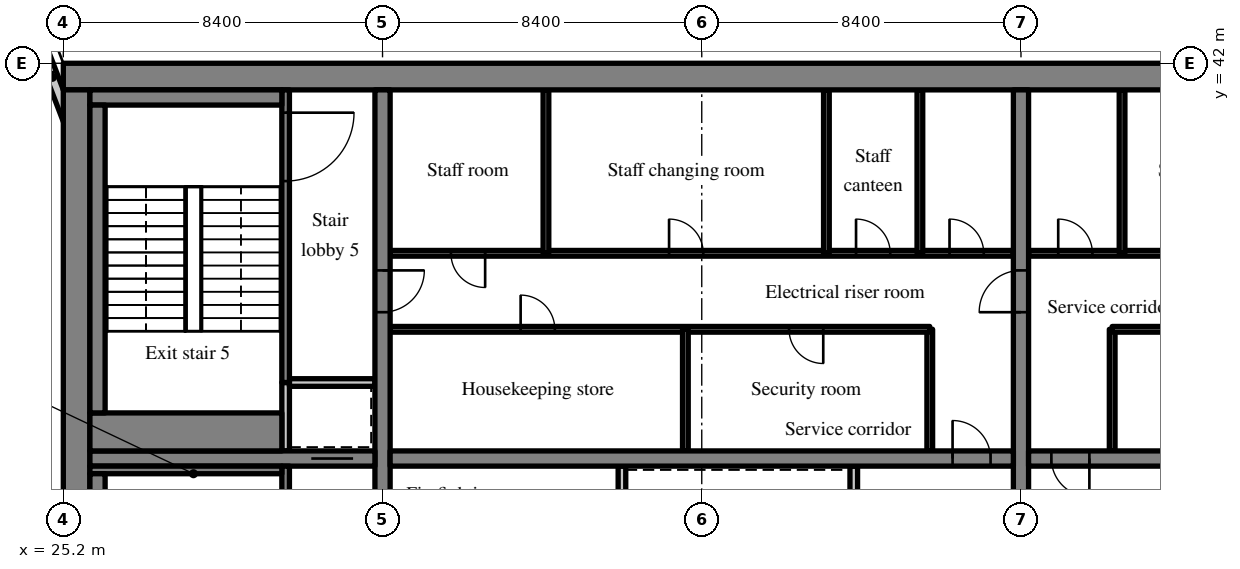
"""IFC4 building model, lengths in metres.
Left out: names, types, materials, properties, quantities, classifications, styles, units other than length and angle.
Written with IfcOpenShell. Run it as: python <this file> out.ifc"""

import sys

from ifc_helpers import new_model, si_unit, direction, frame, frame_2d, origin, place, context, subcontext, project, spatial, rectangle, extrude, source, transform, mapped, element, fill, save


model = new_model("IFC4")
c1 = context("Model", 3, precision=1e-05, world=origin(), true_north=direction((0.0, 1.0)))
c2 = subcontext(c1, "Body", "Model", "MODEL_VIEW")
j1 = project(units=[si_unit("LENGTHUNIT", "METRE"), si_unit("PLANEANGLEUNIT", "RADIAN")], contexts=[c1])
p1 = place(None, origin())
s1 = spatial("IfcSite", under=j1, at=p1, CompositionType="ELEMENT")
p2 = place(p1, origin())
s2 = spatial("IfcBuilding", under=s1, at=p2, CompositionType="ELEMENT")
p3 = place(p2, frame((0.0, 0.0, 174.4)))
s3 = spatial("IfcBuildingStorey", under=s2, at=p3, CompositionType="ELEMENT", Elevation=174.4)
m1 = source(origin(), c2, "Body", "SweptSolid", [
    extrude(rectangle(XDim=50.4, YDim=0.7, at=frame_2d((25.2, 0.0))), origin(), (0.0, 0.0, 1.0), 3.52),
])
p4 = place(p3, frame((25.2, 41.65, 0.0), z_axis=(0.0, 0.0, 1.0), x_axis=(1.0, 0.0, 0.0)))
e1 = element("IfcWall", 1, at=p4, inside=s3, PredefinedType="SHEAR", context=c2, shape_type="MappedRepresentation", body=[
    mapped(m1, transform((0.0, 0.0, 0.0), scale=1.0)),
])
m2 = source(origin(), c2, "Body", "SweptSolid", [
    extrude(rectangle(XDim=18.6, YDim=0.7, at=frame_2d((9.3, 0.0))), origin(), (0.0, 0.0, 1.0), 3.52),
])
p5 = place(p3, frame((25.55, 22.7, 0.0), z_axis=(0.0, 0.0, 1.0), x_axis=(0.0, 1.0, 0.0)))
e2 = element("IfcWall", 2, at=p5, inside=s3, PredefinedType="SHEAR", context=c2, shape_type="MappedRepresentation", body=[
    mapped(m2, transform((0.0, 0.0, 0.0), scale=1.0)),
])
m3 = source(origin(), c2, "Body", "SweptSolid", [
    extrude(rectangle(XDim=18.6, YDim=0.4, at=frame_2d((9.3, 0.0))), origin(), (0.0, 0.0, 1.0), 3.52),
])
p6 = place(p3, frame((33.6, 22.7, 0.0), z_axis=(0.0, 0.0, 1.0), x_axis=(0.0, 1.0, 0.0)))
e3 = element("IfcWall", 3, at=p6, inside=s3, PredefinedType="SHEAR", context=c2, shape_type="MappedRepresentation", body=[
    mapped(m3, transform((0.0, 0.0, 0.0), scale=1.0)),
])
m4 = source(origin(), c2, "Body", "SweptSolid", [
    extrude(rectangle(XDim=1.1, YDim=2.1, at=frame_2d((0.55, 1.05))), frame((0.0, 0.21, 0.0), z_axis=(0.0, -1.0, 0.0), x_axis=(1.0, 0.0, 0.0)), (0.0, 0.0, 1.0), 0.42),
])
p7 = place(p6, frame((12.75, 0.0, 0.0)))
e4 = element("IfcOpeningElement", 4, at=p7, cuts=e3, PredefinedType="OPENING", context=c2, shape_type="MappedRepresentation", body=[
    mapped(m4, transform((0.0, 0.0, 0.0), scale=1.0)),
])
p8 = place(p3, frame((50.4, 22.7, 0.0), z_axis=(0.0, 0.0, 1.0), x_axis=(0.0, 1.0, 0.0)))
e5 = element("IfcWall", 5, at=p8, inside=s3, PredefinedType="SHEAR", context=c2, shape_type="MappedRepresentation", body=[
    mapped(m3, transform((0.0, 0.0, 0.0), scale=1.0)),
])
p9 = place(p8, frame((12.75, 0.0, 0.0)))
e6 = element("IfcOpeningElement", 6, at=p9, cuts=e5, PredefinedType="OPENING", context=c2, shape_type="MappedRepresentation", body=[
    mapped(m4, transform((0.0, 0.0, 0.0), scale=1.0)),
])
m5 = source(origin(), c2, "Body", "SweptSolid", [
    extrude(rectangle(XDim=7.5, YDim=0.4, at=frame_2d((3.75, 0.0))), origin(), (0.0, 0.0, 1.0), 3.52),
])
p10 = place(p3, frame((25.9, 31.6, 0.0), z_axis=(0.0, 0.0, 1.0), x_axis=(1.0, 0.0, 0.0)))
e7 = element("IfcWall", 7, at=p10, inside=s3, PredefinedType="SHEAR", context=c2, shape_type="MappedRepresentation", body=[
    mapped(m5, transform((0.0, 0.0, 0.0), scale=1.0)),
])
p11 = place(p10, frame((5.825, 0.0, 0.0)))
e8 = element("IfcOpeningElement", 8, at=p11, cuts=e7, PredefinedType="OPENING", context=c2, shape_type="MappedRepresentation", body=[
    mapped(m4, transform((0.0, 0.0, 0.0), scale=1.0)),
])
m6 = source(origin(), c2, "Body", "SweptSolid", [
    extrude(rectangle(XDim=16.4, YDim=0.4, at=frame_2d((8.2, 0.0))), origin(), (0.0, 0.0, 1.0), 3.52),
])
p12 = place(p3, frame((33.8, 31.6, 0.0), z_axis=(0.0, 0.0, 1.0), x_axis=(1.0, 0.0, 0.0)))
e9 = element("IfcWall", 9, at=p12, inside=s3, PredefinedType="SHEAR", context=c2, shape_type="MappedRepresentation", body=[
    mapped(m6, transform((0.0, 0.0, 0.0), scale=1.0)),
])
m7 = source(origin(), c2, "Body", "SweptSolid", [
    extrude(rectangle(XDim=1.0, YDim=2.1, at=frame_2d((0.5, 1.05))), frame((0.0, 0.21, 0.0), z_axis=(0.0, -1.0, 0.0), x_axis=(1.0, 0.0, 0.0)), (0.0, 0.0, 1.0), 0.42),
])
p13 = place(p12, frame((14.8, 0.0, 0.0)))
e10 = element("IfcOpeningElement", 10, at=p13, cuts=e9, PredefinedType="OPENING", context=c2, shape_type="MappedRepresentation", body=[
    mapped(m7, transform((0.0, 0.0, 0.0), scale=1.0)),
])
p14 = place(p3, frame((50.6, 31.6, 0.0), z_axis=(0.0, 0.0, 1.0), x_axis=(1.0, 0.0, 0.0)))
e11 = element("IfcWall", 11, at=p14, inside=s3, PredefinedType="SHEAR", context=c2, shape_type="MappedRepresentation", body=[
    mapped(m6, transform((0.0, 0.0, 0.0), scale=1.0)),
])
p15 = place(p14, frame((0.6, 0.0, 0.0)))
e12 = element("IfcOpeningElement", 12, at=p15, cuts=e11, PredefinedType="OPENING", context=c2, shape_type="MappedRepresentation", body=[
    mapped(m7, transform((0.0, 0.0, 0.0), scale=1.0)),
])
m8 = source(origin(), c2, "Body", "SweptSolid", [
    extrude(rectangle(XDim=3.559, YDim=0.3, at=frame_2d((1.78, 0.0))), origin(), (0.0, 0.0, 1.0), 3.52),
])
p16 = place(p3, frame((25.55, 39.969, 0.0), z_axis=(0.0, 0.0, 1.0), x_axis=(-0.35779745313, 0.933799219604, 0.0)))
e13 = element("IfcWall", 13, at=p16, inside=s3, PredefinedType="SOLIDWALL", context=c2, shape_type="MappedRepresentation", body=[
    mapped(m8, transform((0.0, 0.0, 0.0), scale=1.0)),
])
m9 = source(origin(), c2, "Body", "SweptSolid", [
    extrude(rectangle(XDim=1.5, YDim=2.0, at=frame_2d((0.75, 1.0))), frame((0.0, 0.16, 0.0), z_axis=(0.0, -1.0, 0.0), x_axis=(1.0, 0.0, 0.0)), (0.0, 0.0, 1.0), 0.32),
])
p17 = place(p16, frame((1.903, 0.0, 0.9)))
e14 = element("IfcOpeningElement", 14, at=p17, cuts=e13, PredefinedType="OPENING", context=c2, shape_type="MappedRepresentation", body=[
    mapped(m9, transform((0.0, 0.0, 0.0), scale=1.0)),
])
m10 = source(origin(), c2, "Body", "SweptSolid", [
    extrude(rectangle(XDim=8.7, YDim=0.2, at=frame_2d((4.35, 0.0))), origin(), (0.0, 0.0, 1.0), 3.52),
])
p18 = place(p3, frame((39.9, 22.7, 0.0), z_axis=(0.0, 0.0, 1.0), x_axis=(0.0, 1.0, 0.0)))
e15 = element("IfcWall", 15, at=p18, inside=s3, PredefinedType="PARTITIONING", context=c2, shape_type="MappedRepresentation", body=[
    mapped(m10, transform((0.0, 0.0, 0.0), scale=1.0)),
])
m11 = source(origin(), c2, "Body", "SweptSolid", [
    extrude(rectangle(XDim=0.9, YDim=2.1, at=frame_2d((0.45, 1.05))), frame((0.0, 0.11, 0.0), z_axis=(0.0, -1.0, 0.0), x_axis=(1.0, 0.0, 0.0)), (0.0, 0.0, 1.0), 0.22),
])
p19 = place(p18, frame((4.85, 0.0, 0.0)))
e16 = element("IfcOpeningElement", 16, at=p19, cuts=e15, PredefinedType="OPENING", context=c2, shape_type="MappedRepresentation", body=[
    mapped(m11, transform((0.0, 0.0, 0.0), scale=1.0)),
])
m12 = source(origin(), c2, "Body", "SweptSolid", [
    extrude(rectangle(XDim=2.6, YDim=0.2, at=frame_2d((1.3, 0.0))), origin(), (0.0, 0.0, 1.0), 3.52),
])
p20 = place(p3, frame((46.0, 28.8, 0.0), z_axis=(0.0, 0.0, 1.0), x_axis=(0.0, 1.0, 0.0)))
e17 = element("IfcWall", 17, at=p20, inside=s3, PredefinedType="SOLIDWALL", context=c2, shape_type="MappedRepresentation", body=[
    mapped(m12, transform((0.0, 0.0, 0.0), scale=1.0)),
])
m13 = source(origin(), c2, "Body", "SweptSolid", [
    extrude(rectangle(XDim=3.2, YDim=0.15, at=frame_2d((1.6, 0.0))), origin(), (0.0, 0.0, 1.0), 3.52),
])
p21 = place(p3, frame((48.0, 31.8, 0.0), z_axis=(0.0, 0.0, 1.0), x_axis=(0.0, 1.0, 0.0)))
e18 = element("IfcWall", 18, at=p21, inside=s3, PredefinedType="PARTITIONING", context=c2, shape_type="MappedRepresentation", body=[
    mapped(m13, transform((0.0, 0.0, 0.0), scale=1.0)),
])
m14 = source(origin(), c2, "Body", "SweptSolid", [
    extrude(rectangle(XDim=14.2, YDim=0.15, at=frame_2d((7.1, 0.0))), origin(), (0.0, 0.0, 1.0), 3.52),
])
p22 = place(p3, frame((33.8, 35.0, 0.0), z_axis=(0.0, 0.0, 1.0), x_axis=(1.0, 0.0, 0.0)))
e19 = element("IfcWall", 19, at=p22, inside=s3, PredefinedType="PARTITIONING", context=c2, shape_type="MappedRepresentation", body=[
    mapped(m14, transform((0.0, 0.0, 0.0), scale=1.0)),
])
m15 = source(origin(), c2, "Body", "SweptSolid", [
    extrude(rectangle(XDim=0.9, YDim=2.1, at=frame_2d((0.45, 1.05))), frame((0.0, 0.085, 0.0), z_axis=(0.0, -1.0, 0.0), x_axis=(1.0, 0.0, 0.0)), (0.0, 0.0, 1.0), 0.17),
])
p23 = place(p22, frame((3.434, 0.0, 0.0)))
e20 = element("IfcOpeningElement", 20, at=p23, cuts=e19, PredefinedType="OPENING", context=c2, shape_type="MappedRepresentation", body=[
    mapped(m15, transform((0.0, 0.0, 0.0), scale=1.0)),
])
p24 = place(p22, frame((10.497, 0.0, 0.0)))
e21 = element("IfcOpeningElement", 21, at=p24, cuts=e19, PredefinedType="OPENING", context=c2, shape_type="MappedRepresentation", body=[
    mapped(m15, transform((0.0, 0.0, 0.0), scale=1.0)),
])
m16 = source(origin(), c2, "Body", "SweptSolid", [
    extrude(rectangle(XDim=16.4, YDim=0.15, at=frame_2d((8.2, 0.0))), origin(), (0.0, 0.0, 1.0), 3.52),
])
p25 = place(p3, frame((33.8, 37.0, 0.0), z_axis=(0.0, 0.0, 1.0), x_axis=(1.0, 0.0, 0.0)))
e22 = element("IfcWall", 22, at=p25, inside=s3, PredefinedType="PARTITIONING", context=c2, shape_type="MappedRepresentation", body=[
    mapped(m16, transform((0.0, 0.0, 0.0), scale=1.0)),
])
p26 = place(p25, frame((1.6, 0.0, 0.0)))
e23 = element("IfcOpeningElement", 23, at=p26, cuts=e22, PredefinedType="OPENING", context=c2, shape_type="MappedRepresentation", body=[
    mapped(m15, transform((0.0, 0.0, 0.0), scale=1.0)),
])
p27 = place(p25, frame((7.34, 0.0, 0.0)))
e24 = element("IfcOpeningElement", 24, at=p27, cuts=e22, PredefinedType="OPENING", context=c2, shape_type="MappedRepresentation", body=[
    mapped(m15, transform((0.0, 0.0, 0.0), scale=1.0)),
])
p28 = place(p25, frame((12.26, 0.0, 0.0)))
e25 = element("IfcOpeningElement", 25, at=p28, cuts=e22, PredefinedType="OPENING", context=c2, shape_type="MappedRepresentation", body=[
    mapped(m15, transform((0.0, 0.0, 0.0), scale=1.0)),
])
p29 = place(p25, frame((14.72, 0.0, 0.0)))
e26 = element("IfcOpeningElement", 26, at=p29, cuts=e22, PredefinedType="OPENING", context=c2, shape_type="MappedRepresentation", body=[
    mapped(m15, transform((0.0, 0.0, 0.0), scale=1.0)),
])
p30 = place(p3, frame((41.569, 31.8, 0.0), z_axis=(0.0, 0.0, 1.0), x_axis=(0.0, 1.0, 0.0)))
e27 = element("IfcWall", 27, at=p30, inside=s3, PredefinedType="PARTITIONING", context=c2, shape_type="MappedRepresentation", body=[
    mapped(m13, transform((0.0, 0.0, 0.0), scale=1.0)),
])
m17 = source(origin(), c2, "Body", "SweptSolid", [
    extrude(rectangle(XDim=4.3, YDim=0.15, at=frame_2d((2.15, 0.0))), origin(), (0.0, 0.0, 1.0), 3.52),
])
for number, where, z_axis, x_axis in (
    (28, (37.9, 37.0, 0.0), (0.0, 0.0, 1.0), (0.0, 1.0, 0.0)),
    (29, (45.28, 37.0, 0.0), (0.0, 0.0, 1.0), (0.0, 1.0, 0.0)),
    (30, (47.74, 37.0, 0.0), (0.0, 0.0, 1.0), (0.0, 1.0, 0.0)),
):
    element("IfcWall", number, at=place(p3, frame(where, z_axis=z_axis, x_axis=x_axis)), inside=s3, PredefinedType="PARTITIONING", context=c2, shape_type="MappedRepresentation", body=[
        mapped(m17, transform((0.0, 0.0, 0.0), scale=1.0)),
    ])
p31 = place(p3, frame((52.8, 31.8, 0.0), z_axis=(0.0, 0.0, 1.0), x_axis=(0.0, 1.0, 0.0)))
e31 = element("IfcWall", 31, at=p31, inside=s3, PredefinedType="PARTITIONING", context=c2, shape_type="MappedRepresentation", body=[
    mapped(m13, transform((0.0, 0.0, 0.0), scale=1.0)),
])
p32 = place(p3, frame((67.0, 35.0, 0.0), z_axis=(0.0, 0.0, 1.0), x_axis=(-1.0, 0.0, 0.0)))
e32 = element("IfcWall", 32, at=p32, inside=s3, PredefinedType="PARTITIONING", context=c2, shape_type="MappedRepresentation", body=[
    mapped(m14, transform((0.0, 0.0, 0.0), scale=1.0)),
])
p33 = place(p32, frame((6.612, 0.0, 0.0)))
e33 = element("IfcOpeningElement", 33, at=p33, cuts=e32, PredefinedType="OPENING", context=c2, shape_type="MappedRepresentation", body=[
    mapped(m15, transform((0.0, 0.0, 0.0), scale=1.0)),
])
p34 = place(p3, frame((67.0, 37.0, 0.0), z_axis=(0.0, 0.0, 1.0), x_axis=(-1.0, 0.0, 0.0)))
e34 = element("IfcWall", 34, at=p34, inside=s3, PredefinedType="PARTITIONING", context=c2, shape_type="MappedRepresentation", body=[
    mapped(m16, transform((0.0, 0.0, 0.0), scale=1.0)),
])
p35 = place(p34, frame((3.24, 0.0, 0.0)))
e35 = element("IfcOpeningElement", 35, at=p35, cuts=e34, PredefinedType="OPENING", context=c2, shape_type="MappedRepresentation", body=[
    mapped(m15, transform((0.0, 0.0, 0.0), scale=1.0)),
])
p36 = place(p34, frame((8.16, 0.0, 0.0)))
e36 = element("IfcOpeningElement", 36, at=p36, cuts=e34, PredefinedType="OPENING", context=c2, shape_type="MappedRepresentation", body=[
    mapped(m15, transform((0.0, 0.0, 0.0), scale=1.0)),
])
p37 = place(p34, frame((11.44, 0.0, 0.0)))
e37 = element("IfcOpeningElement", 37, at=p37, cuts=e34, PredefinedType="OPENING", context=c2, shape_type="MappedRepresentation", body=[
    mapped(m15, transform((0.0, 0.0, 0.0), scale=1.0)),
])
p38 = place(p34, frame((14.72, 0.0, 0.0)))
e38 = element("IfcOpeningElement", 38, at=p38, cuts=e34, PredefinedType="OPENING", context=c2, shape_type="MappedRepresentation", body=[
    mapped(m15, transform((0.0, 0.0, 0.0), scale=1.0)),
])
p39 = place(p3, frame((53.06, 37.0, 0.0), z_axis=(0.0, 0.0, 1.0), x_axis=(0.0, 1.0, 0.0)))
e39 = element("IfcWall", 39, at=p39, inside=s3, PredefinedType="PARTITIONING", context=c2, shape_type="MappedRepresentation", body=[
    mapped(m17, transform((0.0, 0.0, 0.0), scale=1.0)),
])
m18 = source(origin(), c2, "Body", "SweptSolid", [
    extrude(rectangle(XDim=8.7, YDim=0.2, at=frame_2d((4.35, 0.0))), origin(), (0.0, 0.0, 1.0), 3.52),
])
p40 = place(p3, frame((31.05, 22.7, 0.0), z_axis=(0.0, 0.0, 1.0), x_axis=(0.0, 1.0, 0.0)))
e40 = element("IfcWall", 40, at=p40, inside=s3, PredefinedType="SOLIDWALL", context=c2, shape_type="MappedRepresentation", body=[
    mapped(m18, transform((0.0, 0.0, 0.0), scale=1.0)),
])
m19 = source(origin(), c2, "Body", "SweptSolid", [
    extrude(rectangle(XDim=1.2, YDim=2.1, at=frame_2d((0.6, 1.05))), frame((0.0, 0.11, 0.0), z_axis=(0.0, -1.0, 0.0), x_axis=(1.0, 0.0, 0.0)), (0.0, 0.0, 1.0), 0.22),
])
p41 = place(p40, frame((6.8, 0.0, 0.0)))
e41 = element("IfcOpeningElement", 41, at=p41, cuts=e40, PredefinedType="OPENING", context=c2, shape_type="MappedRepresentation", body=[
    mapped(m19, transform((0.0, 0.0, 0.0), scale=1.0)),
])
m20 = source(origin(), c2, "Body", "SweptSolid", [
    extrude(rectangle(XDim=1.8, YDim=0.2, at=frame_2d((0.9, 0.0))), origin(), (0.0, 0.0, 1.0), 3.52),
])
p42 = place(p3, frame((31.05, 31.8, 0.0), z_axis=(0.0, 0.0, 1.0), x_axis=(0.0, 1.0, 0.0)))
e42 = element("IfcWall", 42, at=p42, inside=s3, PredefinedType="SOLIDWALL", context=c2, shape_type="MappedRepresentation", body=[
    mapped(m20, transform((0.0, 0.0, 0.0), scale=1.0)),
])
m21 = source(origin(), c2, "Body", "SweptSolid", [
    extrude(rectangle(XDim=2.25, YDim=0.2, at=frame_2d((1.125, 0.0))), origin(), (0.0, 0.0, 1.0), 3.52),
])
p43 = place(p3, frame((31.15, 33.6, 0.0), z_axis=(0.0, 0.0, 1.0), x_axis=(1.0, 0.0, 0.0)))
e43 = element("IfcWall", 43, at=p43, inside=s3, PredefinedType="SOLIDWALL", context=c2, shape_type="MappedRepresentation", body=[
    mapped(m21, transform((0.0, 0.0, 0.0), scale=1.0)),
])
m22 = source(origin(), c2, "Body", "SweptSolid", [
    extrude(rectangle(XDim=7.7, YDim=0.2, at=frame_2d((3.85, 0.0))), origin(), (0.0, 0.0, 1.0), 3.52),
])
p44 = place(p3, frame((31.05, 33.6, 0.0), z_axis=(0.0, 0.0, 1.0), x_axis=(0.0, 1.0, 0.0)))
e44 = element("IfcWall", 44, at=p44, inside=s3, PredefinedType="SOLIDWALL", context=c2, shape_type="MappedRepresentation", body=[
    mapped(m22, transform((0.0, 0.0, 0.0), scale=1.0)),
])
m23 = source(origin(), c2, "Body", "SweptSolid", [
    extrude(rectangle(XDim=1.8, YDim=2.1, at=frame_2d((0.9, 1.05))), frame((0.0, 0.11, 0.0), z_axis=(0.0, -1.0, 0.0), x_axis=(1.0, 0.0, 0.0)), (0.0, 0.0, 1.0), 0.22),
])
p45 = place(p44, frame((5.3, 0.0, 0.0)))
e45 = element("IfcOpeningElement", 45, at=p45, cuts=e44, PredefinedType="OPENING", context=c2, shape_type="MappedRepresentation", body=[
    mapped(m23, transform((0.0, 0.0, 0.0), scale=1.0)),
])
m24 = source(origin(), c2, "Body", "SweptSolid", [
    extrude(rectangle(XDim=5.05, YDim=0.2, at=frame_2d((2.525, 0.0))), origin(), (0.0, 0.0, 1.0), 3.52),
])
p46 = place(p3, frame((25.9, 31.3, 0.0), z_axis=(0.0, 0.0, 1.0), x_axis=(1.0, 0.0, 0.0)))
e46 = element("IfcWall", 46, at=p46, inside=s3, PredefinedType="SOLIDWALL", context=c2, shape_type="MappedRepresentation", body=[
    mapped(m24, transform((0.0, 0.0, 0.0), scale=1.0)),
])
m25 = source(origin(), c2, "Body", "SweptSolid", [
    extrude(rectangle(XDim=8.1, YDim=0.4, at=frame_2d((4.05, 0.0))), origin(), (0.0, 0.0, 1.0), 3.52),
])
p47 = place(p3, frame((26.1, 23.1, 0.0), z_axis=(0.0, 0.0, 1.0), x_axis=(0.0, 1.0, 0.0)))
e47 = element("IfcWall", 47, at=p47, inside=s3, PredefinedType="SOLIDWALL", context=c2, shape_type="MappedRepresentation", body=[
    mapped(m25, transform((0.0, 0.0, 0.0), scale=1.0)),
])
m26 = source(origin(), c2, "Body", "SweptSolid", [
    extrude(rectangle(XDim=5.05, YDim=0.4, at=frame_2d((2.525, 0.0))), origin(), (0.0, 0.0, 1.0), 3.52),
])
p48 = place(p3, frame((25.9, 41.1, 0.0), z_axis=(0.0, 0.0, 1.0), x_axis=(1.0, 0.0, 0.0)))
e48 = element("IfcWall", 48, at=p48, inside=s3, PredefinedType="SOLIDWALL", context=c2, shape_type="MappedRepresentation", body=[
    mapped(m26, transform((0.0, 0.0, 0.0), scale=1.0)),
])
m27 = source(origin(), c2, "Body", "SweptSolid", [
    extrude(rectangle(XDim=5.05, YDim=1.0, at=frame_2d((2.525, 0.0))), origin(), (0.0, 0.0, 1.0), 3.52),
])
p49 = place(p3, frame((25.9, 32.3, 0.0), z_axis=(0.0, 0.0, 1.0), x_axis=(1.0, 0.0, 0.0)))
e49 = element("IfcWall", 49, at=p49, inside=s3, PredefinedType="SOLIDWALL", context=c2, shape_type="MappedRepresentation", body=[
    mapped(m27, transform((0.0, 0.0, 0.0), scale=1.0)),
])
p50 = place(p3, frame((26.1, 32.8, 0.0), z_axis=(0.0, 0.0, 1.0), x_axis=(0.0, 1.0, 0.0)))
e50 = element("IfcWall", 50, at=p50, inside=s3, PredefinedType="SOLIDWALL", context=c2, shape_type="MappedRepresentation", body=[
    mapped(m25, transform((0.0, 0.0, 0.0), scale=1.0)),
])
m28 = source(origin(), c2, "Body", "SweptSolid", [
    extrude(rectangle(XDim=1.0, YDim=2.1, at=frame_2d((0.5, 1.05))), frame((0.0, 0.025, 0.0), z_axis=(0.0, -1.0, 0.0), x_axis=(1.0, 0.0, 0.0)), (0.0, 0.0, 1.0), 0.05),
])
p51 = place(p13, origin())
e51 = element("IfcDoor", 51, at=p51, inside=s3, OperationType="SINGLE_SWING_LEFT", PredefinedType="DOOR", context=c2, shape_type="MappedRepresentation", body=[
    mapped(m28, transform((0.0, 0.0, 0.0), scale=1.0)),
])
fill(e10, e51)
m29 = source(origin(), c2, "Body", "SweptSolid", [
    extrude(rectangle(XDim=0.9, YDim=2.1, at=frame_2d((0.45, 1.05))), frame((0.0, 0.025, 0.0), z_axis=(0.0, -1.0, 0.0), x_axis=(1.0, 0.0, 0.0)), (0.0, 0.0, 1.0), 0.05),
])
p52 = place(p23, origin())
e52 = element("IfcDoor", 52, at=p52, inside=s3, OperationType="SINGLE_SWING_LEFT", PredefinedType="DOOR", context=c2, shape_type="MappedRepresentation", body=[
    mapped(m29, transform((0.0, 0.0, 0.0), scale=1.0)),
])
fill(e20, e52)
p53 = place(p24, origin())
e53 = element("IfcDoor", 53, at=p53, inside=s3, OperationType="SINGLE_SWING_RIGHT", PredefinedType="DOOR", context=c2, shape_type="MappedRepresentation", body=[
    mapped(m29, transform((0.0, 0.0, 0.0), scale=1.0)),
])
fill(e21, e53)
p54 = place(p26, origin())
e54 = element("IfcDoor", 54, at=p54, inside=s3, OperationType="SINGLE_SWING_RIGHT", PredefinedType="DOOR", context=c2, shape_type="MappedRepresentation", body=[
    mapped(m29, transform((0.0, 0.0, 0.0), scale=1.0)),
])
fill(e23, e54)
p55 = place(p27, origin())
e55 = element("IfcDoor", 55, at=p55, inside=s3, OperationType="SINGLE_SWING_LEFT", PredefinedType="DOOR", context=c2, shape_type="MappedRepresentation", body=[
    mapped(m29, transform((0.0, 0.0, 0.0), scale=1.0)),
])
fill(e24, e55)
p56 = place(p28, origin())
e56 = element("IfcDoor", 56, at=p56, inside=s3, OperationType="SINGLE_SWING_LEFT", PredefinedType="DOOR", context=c2, shape_type="MappedRepresentation", body=[
    mapped(m29, transform((0.0, 0.0, 0.0), scale=1.0)),
])
fill(e25, e56)
p57 = place(p29, origin())
e57 = element("IfcDoor", 57, at=p57, inside=s3, OperationType="SINGLE_SWING_LEFT", PredefinedType="DOOR", context=c2, shape_type="MappedRepresentation", body=[
    mapped(m29, transform((0.0, 0.0, 0.0), scale=1.0)),
])
fill(e26, e57)
p58 = place(p15, origin())
e58 = element("IfcDoor", 58, at=p58, inside=s3, OperationType="SINGLE_SWING_RIGHT", PredefinedType="DOOR", context=c2, shape_type="MappedRepresentation", body=[
    mapped(m28, transform((0.0, 0.0, 0.0), scale=1.0)),
])
fill(e12, e58)
p59 = place(p38, origin())
e59 = element("IfcDoor", 59, at=p59, inside=s3, OperationType="SINGLE_SWING_RIGHT", PredefinedType="DOOR", context=c2, shape_type="MappedRepresentation", body=[
    mapped(m29, transform((0.0, 0.0, 0.0), scale=1.0)),
])
fill(e38, e59)
m30 = source(origin(), c2, "Body", "SweptSolid", [
    extrude(rectangle(XDim=1.1, YDim=2.1, at=frame_2d((0.55, 1.05))), frame((0.0, 0.025, 0.0), z_axis=(0.0, -1.0, 0.0), x_axis=(1.0, 0.0, 0.0)), (0.0, 0.0, 1.0), 0.05),
])
p60 = place(p11, origin())
e60 = element("IfcDoor", 60, at=p60, inside=s3, OperationType="SLIDING_TO_LEFT", PredefinedType="DOOR", context=c2, shape_type="MappedRepresentation", body=[
    mapped(m30, transform((0.0, 0.0, 0.0), scale=1.0)),
])
fill(e8, e60)
m31 = source(origin(), c2, "Body", "SweptSolid", [
    extrude(rectangle(XDim=1.8, YDim=2.1, at=frame_2d((0.9, 1.05))), frame((0.0, 0.025, 0.0), z_axis=(0.0, -1.0, 0.0), x_axis=(1.0, 0.0, 0.0)), (0.0, 0.0, 1.0), 0.05),
])
p61 = place(p45, origin())
e61 = element("IfcDoor", 61, at=p61, inside=s3, OperationType="SINGLE_SWING_RIGHT", PredefinedType="DOOR", context=c2, shape_type="MappedRepresentation", body=[
    mapped(m31, transform((0.0, 0.0, 0.0), scale=1.0)),
])
fill(e45, e61)
p62 = place(p7, origin())
e62 = element("IfcDoor", 62, at=p62, inside=s3, OperationType="SINGLE_SWING_RIGHT", PredefinedType="DOOR", context=c2, shape_type="MappedRepresentation", body=[
    mapped(m30, transform((0.0, 0.0, 0.0), scale=1.0)),
])
fill(e4, e62)
p63 = place(p9, origin())
e63 = element("IfcDoor", 63, at=p63, inside=s3, OperationType="SINGLE_SWING_LEFT", PredefinedType="DOOR", context=c2, shape_type="MappedRepresentation", body=[
    mapped(m30, transform((0.0, 0.0, 0.0), scale=1.0)),
])
fill(e6, e63)
save(model, sys.argv[1])
